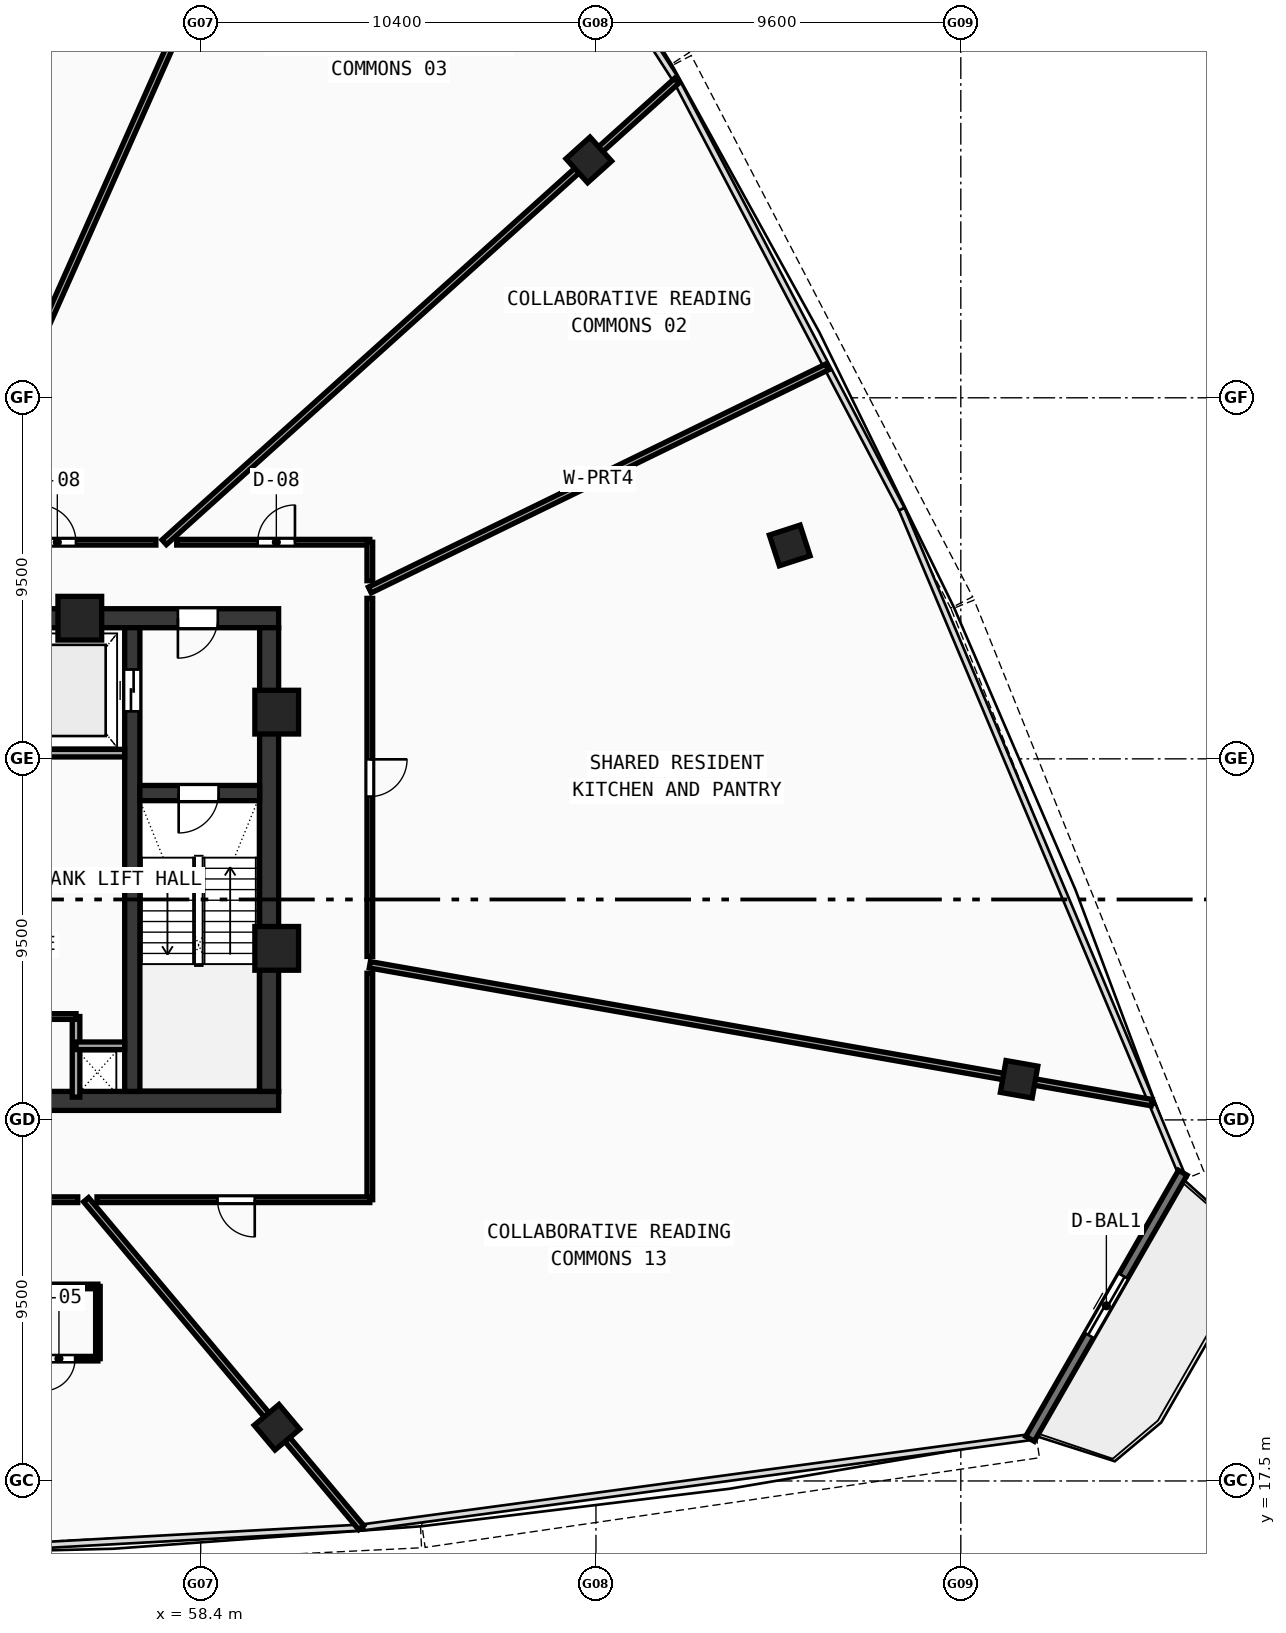
"""IFC4 building model, lengths in metres.
Left out: names, types, materials, properties, quantities, classifications, styles, units other than length and angle.
Written with IfcOpenShell. Run it as: python <this file> out.ifc"""

import sys

from ifc_helpers import new_model, si_unit, direction, frame, frame_2d, origin, origin_with_axes, origin_2d, place, context, subcontext, project, spatial, rectangle, hollow_rectangle, extrude, source, transform, mapped, element, fill, save


model = new_model("IFC4")
c1 = context("Model", 3, precision=1e-05, world=origin(), true_north=direction((0.0, 1.0)))
c2 = subcontext(c1, "Body", "Model", "MODEL_VIEW")
j1 = project(units=[si_unit("LENGTHUNIT", "METRE"), si_unit("PLANEANGLEUNIT", "RADIAN")], contexts=[c1])
p1 = place(None, origin())
s1 = spatial("IfcSite", under=j1, at=p1, CompositionType="ELEMENT")
p2 = place(p1, origin())
s2 = spatial("IfcBuilding", under=s1, at=p2, CompositionType="ELEMENT")
p3 = place(p2, frame((0.0, 0.0, 233.34)))
s3 = spatial("IfcBuildingStorey", under=s2, at=p3, CompositionType="ELEMENT", Elevation=233.34)
p4 = place(p3, frame((35.55, 27.5, 0.0), z_axis=(0.0, 0.0, 1.0), x_axis=(1.0, 0.0, 0.0)))
e1 = element("IfcWall", 1, at=p4, inside=s3, PredefinedType="SHEAR", context=c2, shape_type="SweptSolid", body=[
    extrude(rectangle(XDim=24.9, YDim=0.5, at=frame_2d((12.45, 0.0))), origin(), (0.0, 0.0, 1.0), 3.47),
])
p5 = place(p3, frame((49.2, 40.2, 0.0), z_axis=(0.0, 0.0, 1.0), x_axis=(1.0, 0.0, 0.0)))
e2 = element("IfcWall", 2, at=p5, inside=s3, PredefinedType="SHEAR", context=c2, shape_type="SweptSolid", body=[
    extrude(rectangle(XDim=11.25, YDim=0.5, at=frame_2d((5.625, 0.0))), origin(), (0.0, 0.0, 1.0), 3.47),
])
p6 = place(p5, frame((8.6, 0.0, 0.0)))
e3 = element("IfcOpeningElement", 3, at=p6, cuts=e2, PredefinedType="OPENING", context=c2, shape_type="SweptSolid", body=[
    extrude(rectangle(XDim=1.05, YDim=2.1, at=frame_2d((0.525, 1.05))), frame((0.0, 0.26, 0.0), z_axis=(0.0, -1.0, 0.0), x_axis=(1.0, 0.0, 0.0)), (0.0, 0.0, 1.0), 0.52),
])
p7 = place(p3, frame((60.2, 27.75, 0.0), z_axis=(0.0, 0.0, 1.0), x_axis=(0.0, 1.0, 0.0)))
e4 = element("IfcWall", 4, at=p7, inside=s3, PredefinedType="SHEAR", context=c2, shape_type="SweptSolid", body=[
    extrude(rectangle(XDim=12.2, YDim=0.5, at=frame_2d((6.1, 0.0))), origin(), (0.0, 0.0, 1.0), 3.47),
])
p8 = place(p3, frame((56.6, 27.75, 0.0), z_axis=(0.0, 0.0, 1.0), x_axis=(0.0, 1.0, 0.0)))
e5 = element("IfcWall", 5, at=p8, inside=s3, PredefinedType="SHEAR", context=c2, shape_type="SweptSolid", body=[
    extrude(rectangle(XDim=12.2, YDim=0.4, at=frame_2d((6.1, 0.0))), origin(), (0.0, 0.0, 1.0), 3.47),
])
p9 = place(p8, frame((10.0, 0.0, 0.0)))
e6 = element("IfcOpeningElement", 6, at=p9, cuts=e5, PredefinedType="OPENING", context=c2, shape_type="SweptSolid", body=[
    extrude(rectangle(XDim=1.1, YDim=2.1, at=frame_2d((0.55, 1.05))), frame((0.0, 0.21, 0.0), z_axis=(0.0, -1.0, 0.0), x_axis=(1.0, 0.0, 0.0)), (0.0, 0.0, 1.0), 0.42),
])
p10 = place(p3, frame((56.8, 35.6, 0.0), z_axis=(0.0, 0.0, 1.0), x_axis=(1.0, 0.0, 0.0)))
e7 = element("IfcWall", 7, at=p10, inside=s3, PredefinedType="SHEAR", context=c2, shape_type="SweptSolid", body=[
    extrude(rectangle(XDim=3.15, YDim=0.4, at=frame_2d((1.575, 0.0))), origin(), (0.0, 0.0, 1.0), 3.47),
])
p11 = place(p10, frame((1.02, 0.0, 0.0)))
e8 = element("IfcOpeningElement", 8, at=p11, cuts=e7, PredefinedType="OPENING", context=c2, shape_type="SweptSolid", body=[
    extrude(rectangle(XDim=1.05, YDim=2.1, at=frame_2d((0.525, 1.05))), frame((0.0, 0.21, 0.0), z_axis=(0.0, -1.0, 0.0), x_axis=(1.0, 0.0, 0.0)), (0.0, 0.0, 1.0), 0.42),
])
m1 = source(origin(), c2, "Body", "SweptSolid", [
    extrude(hollow_rectangle(XDim=1.15, YDim=1.15, WallThickness=0.048, at=origin_2d()), origin(), (0.0, 0.0, 1.0), 3.73),
])
for number, where, z_axis, x_axis in (
    (9, (60.4, 31.513, -0.26), (0.0, 0.0, 1.0), (1.0, 0.0, 0.0)),
    (10, (60.4, 37.729, -0.26), (0.0, 0.0, 1.0), (1.0, 0.0, 0.0)),
    (11, (55.219, 40.2, -0.26), (0.0, 0.0, 1.0), (1.0, 0.0, 0.0)),
):
    element("IfcColumn", number, at=place(p3, frame(where, z_axis=z_axis, x_axis=x_axis)), inside=s3, PredefinedType="COLUMN", context=c2, shape_type="MappedRepresentation", body=[
        mapped(m1, transform((0.0, 0.0, 0.0), scale=1.0)),
    ])
m2 = source(origin(), c2, "Body", "SweptSolid", [
    extrude(hollow_rectangle(XDim=0.85, YDim=0.85, WallThickness=0.034, at=origin_2d()), origin(), (0.0, 0.0, 1.0), 3.73),
])
for number, where, z_axis, x_axis in (
    (12, (60.407, 18.914, -0.26), (0.0, 0.0, 1.0), (0.766, 0.643, 0.0)),
    (13, (79.934, 28.069, -0.26), (0.0, 0.0, 1.0), (0.174, 0.985, 0.0)),
    (14, (73.899, 42.115, -0.26), (0.0, 0.0, 1.0), (-0.309, 0.951, 0.0)),
    (15, (68.612, 52.259, -0.26), (0.0, 0.0, 1.0), (-0.669, 0.743, 0.0)),
):
    element("IfcColumn", number, at=place(p3, frame(where, z_axis=z_axis, x_axis=x_axis)), inside=s3, PredefinedType="COLUMN", context=c2, shape_type="MappedRepresentation", body=[
        mapped(m2, transform((0.0, 0.0, 0.0), scale=1.0)),
    ])
p12 = place(p3, frame((80.22, 18.608, 0.0), z_axis=(0.0, 0.0, 1.0), x_axis=(0.49791595327, 0.867225289921, 0.0)))
e16 = element("IfcWall", 16, at=p12, inside=s3, PredefinedType="STANDARD", context=c2, shape_type="SweptSolid", body=[
    extrude(rectangle(XDim=8.074, YDim=0.26, at=frame_2d((4.037, 0.0))), origin(), (0.0, 0.0, 1.0), 3.47),
])
p13 = place(p12, frame((3.137, 0.0, 0.0)))
e17 = element("IfcOpeningElement", 17, at=p13, cuts=e16, PredefinedType="OPENING", context=c2, shape_type="SweptSolid", body=[
    extrude(rectangle(XDim=1.8, YDim=2.15, at=frame_2d((0.9, 1.075))), frame((0.0, 0.14, 0.0), z_axis=(0.0, -1.0, 0.0), x_axis=(1.0, 0.0, 0.0)), (0.0, 0.0, 1.0), 0.28),
])
p14 = place(p3, frame((53.68, 36.65, 0.0), z_axis=(0.0, 0.0, 1.0), x_axis=(1.0, 0.0, 0.0)))
e18 = element("IfcWall", 18, at=p14, inside=s3, PredefinedType="SOLIDWALL", context=c2, shape_type="SweptSolid", body=[
    extrude(rectangle(XDim=2.72, YDim=0.2, at=frame_2d((1.36, 0.0))), origin(), (0.0, 0.0, 1.0), 3.47),
])
p15 = place(p3, frame((55.12, 27.6, 0.0), z_axis=(0.0, 0.0, 1.0), x_axis=(0.0, 1.0, 0.0)))
e19 = element("IfcWall", 19, at=p15, inside=s3, PredefinedType="SOLIDWALL", context=c2, shape_type="SweptSolid", body=[
    extrude(rectangle(XDim=2.12, YDim=0.2, at=frame_2d((1.06, 0.0))), origin(), (0.0, 0.0, 1.0), 3.47),
])
p16 = place(p3, frame((55.12, 28.95, 0.0), z_axis=(0.0, 0.0, 1.0), x_axis=(1.0, 0.0, 0.0)))
e20 = element("IfcWall", 20, at=p16, inside=s3, PredefinedType="SOLIDWALL", context=c2, shape_type="SweptSolid", body=[
    extrude(rectangle(XDim=1.28, YDim=0.2, at=frame_2d((0.64, 0.0))), origin(), (0.0, 0.0, 1.0), 3.47),
])
p17 = place(p3, frame((51.05, 29.72, 0.0), z_axis=(0.0, 0.0, 1.0), x_axis=(1.0, 0.0, 0.0)))
e21 = element("IfcWall", 21, at=p17, inside=s3, PredefinedType="PARTITIONING", context=c2, shape_type="SweptSolid", body=[
    extrude(rectangle(XDim=4.07, YDim=0.15, at=frame_2d((2.035, 0.0))), origin(), (0.0, 0.0, 1.0), 3.47),
])
p18 = place(p17, frame((0.5, 0.0, 0.0)))
e22 = element("IfcOpeningElement", 22, at=p18, cuts=e21, PredefinedType="OPENING", context=c2, shape_type="SweptSolid", body=[
    extrude(rectangle(XDim=0.9, YDim=2.1, at=frame_2d((0.45, 1.05))), frame((0.0, 0.085, 0.0), z_axis=(0.0, -1.0, 0.0), x_axis=(1.0, 0.0, 0.0)), (0.0, 0.0, 1.0), 0.17),
])
p19 = place(p3, frame((62.85, 40.943, 0.0), z_axis=(0.0, 0.0, 1.0), x_axis=(0.89879807188, 0.438362893029, 0.0)))
e23 = element("IfcWall", 23, at=p19, inside=s3, PredefinedType="PARTITIONING", context=c2, shape_type="SweptSolid", body=[
    extrude(rectangle(XDim=13.384, YDim=0.17, at=frame_2d((6.692, 0.0))), origin(), (0.0, 0.0, 1.0), 2.82),
])
p20 = place(p3, frame((57.44, 42.2, 0.0), z_axis=(0.0, 0.0, 1.0), x_axis=(0.743147575456, 0.669127552185, 0.0)))
e24 = element("IfcWall", 24, at=p20, inside=s3, PredefinedType="PARTITIONING", context=c2, shape_type="SweptSolid", body=[
    extrude(rectangle(XDim=18.141, YDim=0.17, at=frame_2d((9.07, 0.0))), origin(), (0.0, 0.0, 1.0), 2.82),
])
p21 = place(p3, frame((51.784, 42.2, 0.0), z_axis=(0.0, 0.0, 1.0), x_axis=(0.406737084028, 0.913545261318, 0.0)))
e25 = element("IfcWall", 25, at=p21, inside=s3, PredefinedType="PARTITIONING", context=c2, shape_type="SweptSolid", body=[
    extrude(rectangle(XDim=27.09, YDim=0.17, at=frame_2d((13.545, 0.0))), origin(), (0.0, 0.0, 1.0), 2.82),
])
p22 = place(p3, frame((55.384, 24.9, 0.0), z_axis=(0.0, 0.0, 1.0), x_axis=(0.642803558478, -0.766031060211, 0.0)))
e26 = element("IfcWall", 26, at=p22, inside=s3, PredefinedType="PARTITIONING", context=c2, shape_type="SweptSolid", body=[
    extrude(rectangle(XDim=11.261, YDim=0.17, at=frame_2d((5.631, 0.0))), origin(), (0.0, 0.0, 1.0), 2.82),
])
p23 = place(p3, frame((62.85, 31.082, 0.0), z_axis=(0.0, 0.0, 1.0), x_axis=(0.984808138799, -0.17364598975, 0.0)))
e27 = element("IfcWall", 27, at=p23, inside=s3, PredefinedType="PARTITIONING", context=c2, shape_type="SweptSolid", body=[
    extrude(rectangle(XDim=20.89, YDim=0.17, at=frame_2d((10.445, 0.0))), origin(), (0.0, 0.0, 1.0), 2.82),
])
p24 = place(p3, frame((52.025, 42.2, 0.0), z_axis=(0.0, 0.0, 1.0), x_axis=(1.0, 0.0, 0.0)))
e28 = element("IfcWall", 28, at=p24, inside=s3, PredefinedType="PARTITIONING", context=c2, shape_type="SweptSolid", body=[
    extrude(rectangle(XDim=5.195, YDim=0.15, at=frame_2d((2.598, 0.0))), origin(), (0.0, 0.0, 1.0), 2.82),
])
p25 = place(p24, frame((2.112, 0.0, 0.0)))
e29 = element("IfcOpeningElement", 29, at=p25, cuts=e28, PredefinedType="OPENING", context=c2, shape_type="SweptSolid", body=[
    extrude(rectangle(XDim=0.98, YDim=2.12, at=frame_2d((0.49, 1.06))), frame((0.0, 0.085, 0.0), z_axis=(0.0, -1.0, 0.0), x_axis=(1.0, 0.0, 0.0)), (0.0, 0.0, 1.0), 0.17),
])
p26 = place(p3, frame((57.769, 42.2, 0.0), z_axis=(0.0, 0.0, 1.0), x_axis=(1.0, 0.0, 0.0)))
e30 = element("IfcWall", 30, at=p26, inside=s3, PredefinedType="PARTITIONING", context=c2, shape_type="SweptSolid", body=[
    extrude(rectangle(XDim=5.081, YDim=0.15, at=frame_2d((2.541, 0.0))), origin(), (0.0, 0.0, 1.0), 3.12),
])
p27 = place(p26, frame((2.131, 0.0, 0.0)))
e31 = element("IfcOpeningElement", 31, at=p27, cuts=e30, PredefinedType="OPENING", context=c2, shape_type="SweptSolid", body=[
    extrude(rectangle(XDim=0.98, YDim=2.12, at=frame_2d((0.49, 1.06))), frame((0.0, 0.085, 0.0), z_axis=(0.0, -1.0, 0.0), x_axis=(1.0, 0.0, 0.0)), (0.0, 0.0, 1.0), 0.17),
])
p28 = place(p3, frame((62.85, 42.2, 0.0), z_axis=(0.0, 0.0, 1.0), x_axis=(0.0, -1.0, 0.0)))
e32 = element("IfcWall", 32, at=p28, inside=s3, PredefinedType="PARTITIONING", context=c2, shape_type="SweptSolid", body=[
    extrude(rectangle(XDim=1.012, YDim=0.15, at=frame_2d((0.506, 0.0))), origin(), (0.0, 0.0, 1.0), 3.12),
])
p29 = place(p3, frame((62.85, 40.723, 0.0), z_axis=(0.0, 0.0, 1.0), x_axis=(0.0, -1.0, 0.0)))
e33 = element("IfcWall", 33, at=p29, inside=s3, PredefinedType="PARTITIONING", context=c2, shape_type="SweptSolid", body=[
    extrude(rectangle(XDim=9.422, YDim=0.15, at=frame_2d((4.711, 0.0))), origin(), (0.0, 0.0, 1.0), 2.82),
])
p30 = place(p29, frame((4.236, 0.0, 0.0)))
e34 = element("IfcOpeningElement", 34, at=p30, cuts=e33, PredefinedType="OPENING", context=c2, shape_type="SweptSolid", body=[
    extrude(rectangle(XDim=0.98, YDim=2.12, at=frame_2d((0.49, 1.06))), frame((0.0, 0.085, 0.0), z_axis=(0.0, -1.0, 0.0), x_axis=(1.0, 0.0, 0.0)), (0.0, 0.0, 1.0), 0.17),
])
p31 = place(p3, frame((62.85, 30.858, 0.0), z_axis=(0.0, 0.0, 1.0), x_axis=(0.0, -1.0, 0.0)))
e35 = element("IfcWall", 35, at=p31, inside=s3, PredefinedType="PARTITIONING", context=c2, shape_type="SweptSolid", body=[
    extrude(rectangle(XDim=5.958, YDim=0.15, at=frame_2d((2.979, 0.0))), origin(), (0.0, 0.0, 1.0), 3.12),
])
p32 = place(p3, frame((62.85, 24.9, 0.0), z_axis=(0.0, 0.0, 1.0), x_axis=(-1.0, 0.0, 0.0)))
e36 = element("IfcWall", 36, at=p32, inside=s3, PredefinedType="PARTITIONING", context=c2, shape_type="SweptSolid", body=[
    extrude(rectangle(XDim=7.179, YDim=0.15, at=frame_2d((3.589, 0.0))), origin(), (0.0, 0.0, 1.0), 3.12),
])
p33 = place(p32, frame((3.028, 0.0, 0.0)))
e37 = element("IfcOpeningElement", 37, at=p33, cuts=e36, PredefinedType="OPENING", context=c2, shape_type="SweptSolid", body=[
    extrude(rectangle(XDim=0.98, YDim=2.12, at=frame_2d((0.49, 1.06))), frame((0.0, 0.085, 0.0), z_axis=(0.0, -1.0, 0.0), x_axis=(1.0, 0.0, 0.0)), (0.0, 0.0, 1.0), 0.17),
])
p34 = place(p3, frame((55.164, 24.9, 0.0), z_axis=(0.0, 0.0, 1.0), x_axis=(-1.0, 0.0, 0.0)))
e38 = element("IfcWall", 38, at=p34, inside=s3, PredefinedType="PARTITIONING", context=c2, shape_type="SweptSolid", body=[
    extrude(rectangle(XDim=4.579, YDim=0.15, at=frame_2d((2.289, 0.0))), origin(), (0.0, 0.0, 1.0), 2.82),
])
p35 = place(p34, frame((1.818, 0.0, 0.0)))
e39 = element("IfcOpeningElement", 39, at=p35, cuts=e38, PredefinedType="OPENING", context=c2, shape_type="SweptSolid", body=[
    extrude(rectangle(XDim=0.98, YDim=2.12, at=frame_2d((0.49, 1.06))), frame((0.0, 0.085, 0.0), z_axis=(0.0, -1.0, 0.0), x_axis=(1.0, 0.0, 0.0)), (0.0, 0.0, 1.0), 0.17),
])
p36 = place(p3, frame((53.645, 20.718, 0.0), z_axis=(0.0, 0.0, 1.0), x_axis=(1.0, 0.0, 0.0)))
e40 = element("IfcWall", 40, at=p36, inside=s3, PredefinedType="PARTITIONING", context=c2, shape_type="SweptSolid", body=[
    extrude(rectangle(XDim=2.05, YDim=0.12, at=frame_2d((1.025, 0.0))), origin(), (0.0, 0.0, 1.0), 3.47),
])
p37 = place(p36, frame((0.6, 0.0, 0.0)))
e41 = element("IfcOpeningElement", 41, at=p37, cuts=e40, PredefinedType="OPENING", context=c2, shape_type="SweptSolid", body=[
    extrude(rectangle(XDim=0.85, YDim=2.1, at=frame_2d((0.425, 1.05))), frame((0.0, 0.07, 0.0), z_axis=(0.0, -1.0, 0.0), x_axis=(1.0, 0.0, 0.0)), (0.0, 0.0, 1.0), 0.14),
])
p38 = place(p3, frame((55.695, 20.718, 0.0), z_axis=(0.0, 0.0, 1.0), x_axis=(0.0, 1.0, 0.0)))
e42 = element("IfcWall", 42, at=p38, inside=s3, PredefinedType="PARTITIONING", context=c2, shape_type="SweptSolid", body=[
    extrude(rectangle(XDim=1.9, YDim=0.12, at=frame_2d((0.95, 0.0))), origin(), (0.0, 0.0, 1.0), 3.12),
])
p39 = place(p3, frame((55.695, 22.618, 0.0), z_axis=(0.0, 0.0, 1.0), x_axis=(-1.0, 0.0, 0.0)))
e43 = element("IfcWall", 43, at=p39, inside=s3, PredefinedType="PARTITIONING", context=c2, shape_type="SweptSolid", body=[
    extrude(rectangle(XDim=2.05, YDim=0.12, at=frame_2d((1.025, 0.0))), origin(), (0.0, 0.0, 1.0), 3.47),
])
m3 = source(origin(), c2, "Body", "SweptSolid", [
    extrude(rectangle(XDim=1.8, YDim=2.15, at=frame_2d((0.9, 1.075))), frame((0.0, 0.025, 0.0), z_axis=(0.0, -1.0, 0.0), x_axis=(1.0, 0.0, 0.0)), (0.0, 0.0, 1.0), 0.05),
])
p40 = place(p13, origin_with_axes())
e44 = element("IfcDoor", 44, at=p40, inside=s3, OperationType="DOUBLE_DOOR_SLIDING", PredefinedType="DOOR", context=c2, shape_type="MappedRepresentation", body=[
    mapped(m3, transform((0.0, 0.0, 0.0), scale=1.0)),
])
fill(e17, e44)
m4 = source(origin(), c2, "Body", "SweptSolid", [
    extrude(rectangle(XDim=1.05, YDim=2.1, at=frame_2d((0.525, 1.05))), frame((0.0, 0.025, 0.0), z_axis=(0.0, -1.0, 0.0), x_axis=(1.0, 0.0, 0.0)), (0.0, 0.0, 1.0), 0.05),
])
p41 = place(p11, frame((1.05, 0.0, 0.0), z_axis=(0.0, 0.0, 1.0), x_axis=(-1.0, 0.0, 0.0)))
e45 = element("IfcDoor", 45, at=p41, inside=s3, OperationType="SINGLE_SWING_RIGHT", PredefinedType="DOOR", context=c2, shape_type="MappedRepresentation", body=[
    mapped(m4, transform((0.0, 0.0, 0.0), scale=1.0)),
])
fill(e8, e45)
p42 = place(p6, frame((1.05, 0.0, 0.0), z_axis=(0.0, 0.0, 1.0), x_axis=(-1.0, 0.0, 0.0)))
e46 = element("IfcDoor", 46, at=p42, inside=s3, OperationType="SINGLE_SWING_RIGHT", PredefinedType="DOOR", context=c2, shape_type="MappedRepresentation", body=[
    mapped(m4, transform((0.0, 0.0, 0.0), scale=1.0)),
])
fill(e3, e46)
m5 = source(origin(), c2, "Body", "SweptSolid", [
    extrude(rectangle(XDim=1.1, YDim=2.1, at=frame_2d((0.55, 1.05))), frame((0.0, 0.025, 0.0), z_axis=(0.0, -1.0, 0.0), x_axis=(1.0, 0.0, 0.0)), (0.0, 0.0, 1.0), 0.05),
])
p43 = place(p9, origin_with_axes())
e47 = element("IfcDoor", 47, at=p43, inside=s3, OperationType="DOUBLE_DOOR_SLIDING", PredefinedType="DOOR", context=c2, shape_type="MappedRepresentation", body=[
    mapped(m5, transform((0.0, 0.0, 0.0), scale=1.0)),
])
fill(e6, e47)
m6 = source(origin(), c2, "Body", "SweptSolid", [
    extrude(rectangle(XDim=0.98, YDim=2.12, at=frame_2d((0.49, 1.06))), frame((0.0, 0.025, 0.0), z_axis=(0.0, -1.0, 0.0), x_axis=(1.0, 0.0, 0.0)), (0.0, 0.0, 1.0), 0.05),
])
p44 = place(p30, origin_with_axes())
e48 = element("IfcDoor", 48, at=p44, inside=s3, OperationType="SINGLE_SWING_LEFT", PredefinedType="DOOR", context=c2, shape_type="MappedRepresentation", body=[
    mapped(m6, transform((0.0, 0.0, 0.0), scale=1.0)),
])
fill(e34, e48)
p45 = place(p27, origin_with_axes())
e49 = element("IfcDoor", 49, at=p45, inside=s3, OperationType="SINGLE_SWING_RIGHT", PredefinedType="DOOR", context=c2, shape_type="MappedRepresentation", body=[
    mapped(m6, transform((0.0, 0.0, 0.0), scale=1.0)),
])
fill(e31, e49)
p46 = place(p25, origin_with_axes())
e50 = element("IfcDoor", 50, at=p46, inside=s3, OperationType="SINGLE_SWING_LEFT", PredefinedType="DOOR", context=c2, shape_type="MappedRepresentation", body=[
    mapped(m6, transform((0.0, 0.0, 0.0), scale=1.0)),
])
fill(e29, e50)
m7 = source(origin(), c2, "Body", "SweptSolid", [
    extrude(rectangle(XDim=0.85, YDim=2.1, at=frame_2d((0.425, 1.05))), frame((0.0, 0.025, 0.0), z_axis=(0.0, -1.0, 0.0), x_axis=(1.0, 0.0, 0.0)), (0.0, 0.0, 1.0), 0.05),
])
p47 = place(p37, frame((0.85, 0.0, 0.0), z_axis=(0.0, 0.0, 1.0), x_axis=(-1.0, 0.0, 0.0)))
e51 = element("IfcDoor", 51, at=p47, inside=s3, OperationType="SINGLE_SWING_RIGHT", PredefinedType="DOOR", context=c2, shape_type="MappedRepresentation", body=[
    mapped(m7, transform((0.0, 0.0, 0.0), scale=1.0)),
])
fill(e41, e51)
p48 = place(p33, origin_with_axes())
e52 = element("IfcDoor", 52, at=p48, inside=s3, OperationType="SINGLE_SWING_LEFT", PredefinedType="DOOR", context=c2, shape_type="MappedRepresentation", body=[
    mapped(m6, transform((0.0, 0.0, 0.0), scale=1.0)),
])
fill(e37, e52)
save(model, sys.argv[1])
